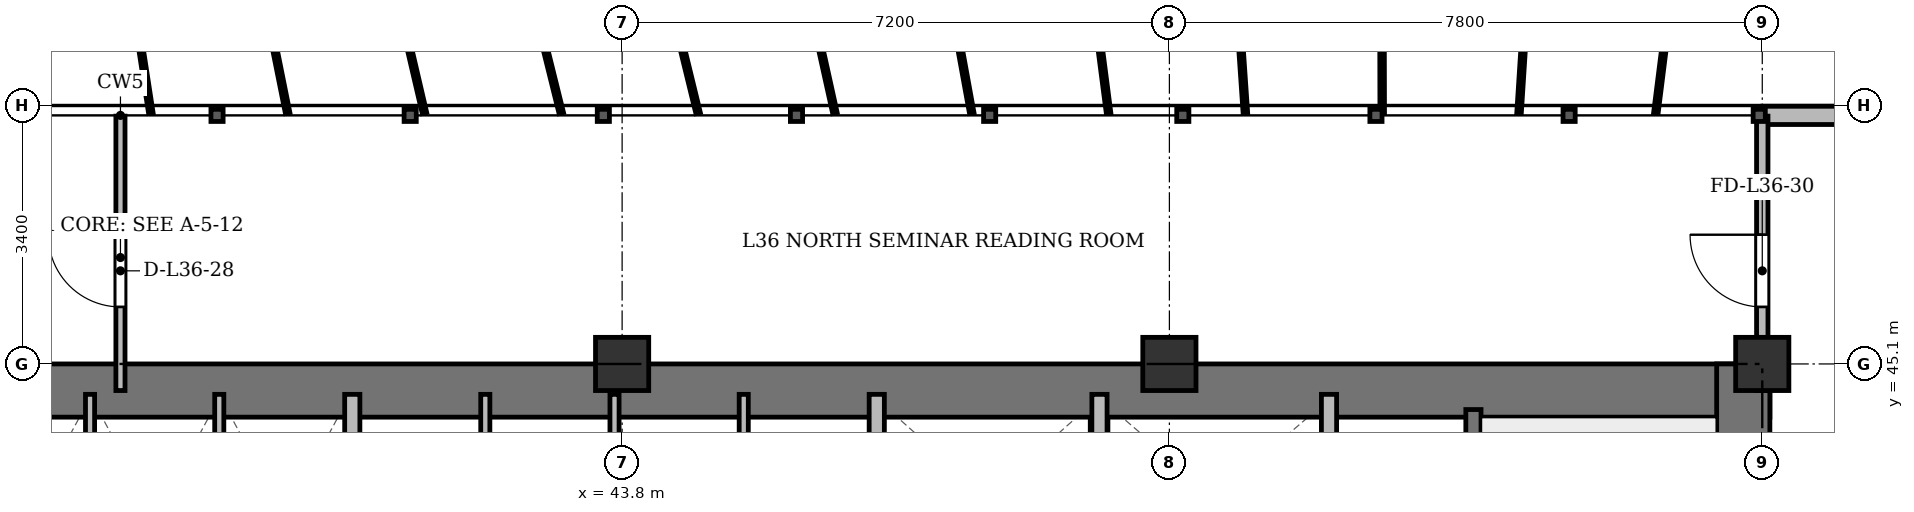
"""IFC4 building model, lengths in metres.
Left out: names, types, materials, properties, quantities, classifications, styles, units other than length and angle.
Written with IfcOpenShell. Run it as: python <this file> out.ifc"""

import sys

from ifc_helpers import new_model, si_unit, direction, frame, frame_2d, origin, origin_2d, place, context, subcontext, project, spatial, rectangle, extrude, source, transform, mapped, element, fill, save


model = new_model("IFC4")
c1 = context("Model", 3, precision=1e-05, world=origin(), true_north=direction((0.0, 1.0)))
c2 = subcontext(c1, "Body", "Model", "MODEL_VIEW")
j1 = project(units=[si_unit("LENGTHUNIT", "METRE"), si_unit("PLANEANGLEUNIT", "RADIAN")], contexts=[c1])
p1 = place(None, origin())
s1 = spatial("IfcSite", under=j1, at=p1, CompositionType="ELEMENT")
p2 = place(p1, origin())
s2 = spatial("IfcBuilding", under=s1, at=p2, CompositionType="ELEMENT")
p3 = place(p2, frame((0.0, 0.0, 139.3)))
s3 = spatial("IfcBuildingStorey", under=s2, at=p3, CompositionType="ELEMENT", Elevation=139.3)
m1 = source(origin(), c2, "Body", "SweptSolid", [
    extrude(rectangle(XDim=0.7, YDim=0.7, at=origin_2d()), origin(), (0.0, 0.0, 1.0), 3.6),
])
for number, where, z_axis, x_axis in (
    (1, (43.8, 45.1, 0.0), (0.0, 0.0, 1.0), (1.0, 0.0, 0.0)),
    (2, (51.0, 45.1, 0.0), (0.0, 0.0, 1.0), (1.0, 0.0, 0.0)),
    (3, (58.8, 45.1, 0.0), (0.0, 0.0, 1.0), (1.0, 0.0, 0.0)),
):
    element("IfcColumn", number, at=place(p3, frame(where, z_axis=z_axis, x_axis=x_axis)), inside=s3, PredefinedType="COLUMN", context=c2, shape_type="MappedRepresentation", body=[
        mapped(m1, transform((0.0, 0.0, 0.0), x_axis=(1.0, 0.0, 0.0), y_axis=(0.0, 1.0, 0.0), z_axis=(0.0, 0.0, 1.0), scale=1.0)),
    ])
p4 = place(p3, frame((58.8, 48.37, 0.0), z_axis=(0.0, 0.0, 1.0), x_axis=(1.0, 0.0, 0.0)))
e4 = element("IfcWall", 4, at=p4, inside=s3, PredefinedType="SOLIDWALL", context=c2, shape_type="SweptSolid", body=[
    extrude(rectangle(XDim=4.7, YDim=0.24, at=frame_2d((2.35, 0.0))), origin(), (0.0, 0.0, 1.0), 3.35),
])
p5 = place(p4, frame((1.368, 0.0, 0.9)))
e5 = element("IfcOpeningElement", 5, at=p5, cuts=e4, PredefinedType="OPENING", context=c2, shape_type="SweptSolid", body=[
    extrude(rectangle(XDim=1.2, YDim=1.65, at=frame_2d((0.6, 0.825))), frame((0.0, 0.13, 0.0), z_axis=(0.0, -1.0, 0.0), x_axis=(1.0, 0.0, 0.0)), (0.0, 0.0, 1.0), 0.26),
])
p6 = place(p3, frame((15.5, 44.75, 0.0), z_axis=(0.0, 0.0, 1.0), x_axis=(1.0, 0.0, 0.0)))
e6 = element("IfcWall", 6, at=p6, inside=s3, PredefinedType="SHEAR", context=c2, shape_type="SweptSolid", body=[
    extrude(rectangle(XDim=43.4, YDim=0.7, at=frame_2d((21.7, 0.0))), origin(), (0.0, 0.0, 1.0), 3.35),
])
p7 = place(p3, frame((58.55, 33.4, 0.0), z_axis=(0.0, 0.0, 1.0), x_axis=(0.0, 1.0, 0.0)))
e7 = element("IfcWall", 7, at=p7, inside=s3, PredefinedType="SHEAR", context=c2, shape_type="SweptSolid", body=[
    extrude(rectangle(XDim=11.7, YDim=0.7, at=frame_2d((5.85, 0.0))), origin(), (0.0, 0.0, 1.0), 3.35),
])
p8 = place(p3, frame((55.0, 33.4, 0.0), z_axis=(0.0, 0.0, 1.0), x_axis=(0.0, 1.0, 0.0)))
e8 = element("IfcWall", 8, at=p8, inside=s3, PredefinedType="SHEAR", context=c2, shape_type="SweptSolid", body=[
    extrude(rectangle(XDim=11.1, YDim=0.2, at=frame_2d((5.55, 0.0))), origin(), (0.0, 0.0, 1.0), 3.35),
])
p9 = place(p8, frame((0.85, 0.0, 0.0)))
e9 = element("IfcOpeningElement", 9, at=p9, cuts=e8, PredefinedType="OPENING", context=c2, shape_type="SweptSolid", body=[
    extrude(rectangle(XDim=1.1, YDim=2.15, at=frame_2d((0.55, 1.075))), frame((0.0, 0.11, 0.0), z_axis=(0.0, -1.0, 0.0), x_axis=(1.0, 0.0, 0.0)), (0.0, 0.0, 1.0), 0.22),
])
for number, where, z_axis, x_axis in (
    (10, (36.8, 41.5, 0.0), (0.0, 0.0, 1.0), (0.0, 1.0, 0.0)),
    (11, (38.5, 41.5, 0.0), (0.0, 0.0, 1.0), (0.0, 1.0, 0.0)),
):
    element("IfcWall", number, at=place(p3, frame(where, z_axis=z_axis, x_axis=x_axis)), inside=s3, PredefinedType="PARTITIONING", context=c2, shape_type="SweptSolid", body=[
        extrude(rectangle(XDim=3.2, YDim=0.12, at=frame_2d((1.6, 0.0))), origin(), (0.0, 0.0, 1.0), 3.35),
    ])
p10 = place(p3, frame((40.25, 41.5, 0.0), z_axis=(0.0, 0.0, 1.0), x_axis=(0.0, 1.0, 0.0)))
e12 = element("IfcWall", 12, at=p10, inside=s3, PredefinedType="SOLIDWALL", context=c2, shape_type="SweptSolid", body=[
    extrude(rectangle(XDim=3.2, YDim=0.2, at=frame_2d((1.6, 0.0))), origin(), (0.0, 0.0, 1.0), 3.35),
])
p11 = place(p3, frame((42.0, 41.5, 0.0), z_axis=(0.0, 0.0, 1.0), x_axis=(0.0, 1.0, 0.0)))
e13 = element("IfcWall", 13, at=p11, inside=s3, PredefinedType="PARTITIONING", context=c2, shape_type="SweptSolid", body=[
    extrude(rectangle(XDim=3.2, YDim=0.12, at=frame_2d((1.6, 0.0))), origin(), (0.0, 0.0, 1.0), 3.35),
])
p12 = place(p3, frame((43.7, 41.5, 0.0), z_axis=(0.0, 0.0, 1.0), x_axis=(0.0, 1.0, 0.0)))
e14 = element("IfcWall", 14, at=p12, inside=s3, PredefinedType="PARTITIONING", context=c2, shape_type="SweptSolid", body=[
    extrude(rectangle(XDim=3.2, YDim=0.12, at=frame_2d((1.6, 0.0))), origin(), (0.0, 0.0, 1.0), 2.85),
])
p13 = place(p3, frame((45.4, 41.5, 0.0), z_axis=(0.0, 0.0, 1.0), x_axis=(0.0, 1.0, 0.0)))
e15 = element("IfcWall", 15, at=p13, inside=s3, PredefinedType="PARTITIONING", context=c2, shape_type="SweptSolid", body=[
    extrude(rectangle(XDim=3.2, YDim=0.12, at=frame_2d((1.6, 0.0))), origin(), (0.0, 0.0, 1.0), 3.35),
])
p14 = place(p3, frame((47.15, 33.4, 0.0), z_axis=(0.0, 0.0, 1.0), x_axis=(0.0, 1.0, 0.0)))
e16 = element("IfcWall", 16, at=p14, inside=s3, PredefinedType="SOLIDWALL", context=c2, shape_type="SweptSolid", body=[
    extrude(rectangle(XDim=11.3, YDim=0.2, at=frame_2d((5.65, 0.0))), origin(), (0.0, 0.0, 1.0), 2.75),
])
for number, where, z_axis, x_axis in (
    (17, (50.08, 42.05, 0.0), (0.0, 0.0, 1.0), (0.0, 1.0, 0.0)),
    (18, (53.1, 42.05, 0.0), (0.0, 0.0, 1.0), (0.0, 1.0, 0.0)),
):
    element("IfcWall", number, at=place(p3, frame(where, z_axis=z_axis, x_axis=x_axis)), inside=s3, PredefinedType="SOLIDWALL", context=c2, shape_type="SweptSolid", body=[
        extrude(rectangle(XDim=2.65, YDim=0.2, at=frame_2d((1.325, 0.0))), origin(), (0.0, 0.0, 1.0), 3.35),
    ])
p15 = place(p3, frame((37.2, 44.75, 0.0), z_axis=(0.0, 0.0, 1.0), x_axis=(0.0, 1.0, 0.0)))
e19 = element("IfcWall", 19, at=p15, inside=s3, PredefinedType="PARTITIONING", context=c2, shape_type="SweptSolid", body=[
    extrude(rectangle(XDim=3.61, YDim=0.12, at=frame_2d((1.805, 0.0))), origin(), (0.0, 0.0, 1.0), 2.75),
])
p16 = place(p15, frame((1.1, 0.0, 0.0)))
e20 = element("IfcOpeningElement", 20, at=p16, cuts=e19, PredefinedType="OPENING", context=c2, shape_type="SweptSolid", body=[
    extrude(rectangle(XDim=0.95, YDim=2.15, at=frame_2d((0.475, 1.075))), frame((0.0, 0.07, 0.0), z_axis=(0.0, -1.0, 0.0), x_axis=(1.0, 0.0, 0.0)), (0.0, 0.0, 1.0), 0.14),
])
p17 = place(p3, frame((58.8, 44.75, 0.0), z_axis=(0.0, 0.0, 1.0), x_axis=(0.0, 1.0, 0.0)))
e21 = element("IfcWall", 21, at=p17, inside=s3, PredefinedType="PARTITIONING", context=c2, shape_type="SweptSolid", body=[
    extrude(rectangle(XDim=3.61, YDim=0.15, at=frame_2d((1.805, 0.0))), origin(), (0.0, 0.0, 1.0), 2.85),
])
p18 = place(p17, frame((1.1, 0.0, 0.0)))
e22 = element("IfcOpeningElement", 22, at=p18, cuts=e21, PredefinedType="OPENING", context=c2, shape_type="SweptSolid", body=[
    extrude(rectangle(XDim=0.95, YDim=2.15, at=frame_2d((0.475, 1.075))), frame((0.0, 0.085, 0.0), z_axis=(0.0, -1.0, 0.0), x_axis=(1.0, 0.0, 0.0)), (0.0, 0.0, 1.0), 0.17),
])
m2 = source(origin(), c2, "Body", "SweptSolid", [
    extrude(rectangle(XDim=0.95, YDim=2.15, at=frame_2d((0.475, 1.075))), frame((0.0, 0.025, 0.0), z_axis=(0.0, -1.0, 0.0), x_axis=(1.0, 0.0, 0.0)), (0.0, 0.0, 1.0), 0.05),
])
p19 = place(p16, origin())
e23 = element("IfcDoor", 23, at=p19, inside=s3, OperationType="SINGLE_SWING_RIGHT", PredefinedType="DOOR", context=c2, shape_type="MappedRepresentation", body=[
    mapped(m2, transform((0.0, 0.0, 0.0), x_axis=(1.0, 0.0, 0.0), y_axis=(0.0, 1.0, 0.0), z_axis=(0.0, 0.0, 1.0), scale=1.0)),
])
fill(e20, e23)
p20 = place(p18, origin())
e24 = element("IfcDoor", 24, at=p20, inside=s3, OperationType="SINGLE_SWING_RIGHT", PredefinedType="DOOR", context=c2, shape_type="MappedRepresentation", body=[
    mapped(m2, transform((0.0, 0.0, 0.0), x_axis=(1.0, 0.0, 0.0), y_axis=(0.0, 1.0, 0.0), z_axis=(0.0, 0.0, 1.0), scale=1.0)),
])
fill(e22, e24)
save(model, sys.argv[1])
